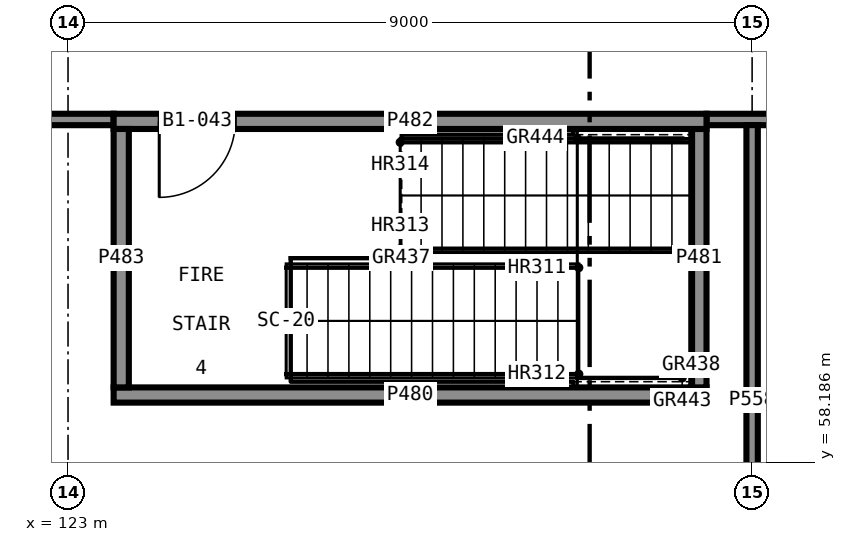
"""IFC4 building model, lengths in metres.
Left out: names, types, materials, properties, quantities, classifications, styles, units other than length and angle.
Written with IfcOpenShell. Run it as: python <this file> out.ifc"""

import sys

from ifc_helpers import new_model, si_unit, direction, frame, frame_2d, origin, place, context, subcontext, project, spatial, rectangle, extrude, element, fill, save


model = new_model("IFC4")
c1 = context("Model", 3, precision=1e-05, world=origin(), true_north=direction((0.0, 1.0)))
c2 = subcontext(c1, "Body", "Model", "MODEL_VIEW")
j1 = project(units=[si_unit("LENGTHUNIT", "METRE"), si_unit("PLANEANGLEUNIT", "RADIAN")], contexts=[c1])
p1 = place(None, origin())
s1 = spatial("IfcSite", under=j1, at=p1, CompositionType="ELEMENT")
p2 = place(p1, origin())
s2 = spatial("IfcBuilding", under=s1, at=p2, CompositionType="ELEMENT")
p3 = place(p2, frame((0.0, 0.0, -5.0)))
s3 = spatial("IfcBuildingStorey", under=s2, at=p3, CompositionType="ELEMENT", Elevation=-5.0)
p4 = place(p3, frame((123.6, 59.075, 0.0), z_axis=(0.0, 0.0, 1.0), x_axis=(1.0, 0.0, 0.0)))
e1 = element("IfcWall", 1, at=p4, inside=s3, PredefinedType="SHEAR", context=c2, shape_type="SweptSolid", body=[
    extrude(rectangle(XDim=7.8, YDim=0.2, at=frame_2d((3.9, 0.0))), origin(), (0.0, 0.0, 1.0), 4.58),
])
p5 = place(p3, frame((131.3, 59.175, 0.0), z_axis=(0.0, 0.0, 1.0), x_axis=(0.0, 1.0, 0.0)))
e2 = element("IfcWall", 2, at=p5, inside=s3, PredefinedType="SHEAR", context=c2, shape_type="SweptSolid", body=[
    extrude(rectangle(XDim=3.4, YDim=0.2, at=frame_2d((1.7, 0.0))), origin(), (0.0, 0.0, 1.0), 4.58),
])
p6 = place(p3, frame((131.4, 62.675, 0.0), z_axis=(0.0, 0.0, 1.0), x_axis=(-1.0, 0.0, 0.0)))
e3 = element("IfcWall", 3, at=p6, inside=s3, PredefinedType="SHEAR", context=c2, shape_type="SweptSolid", body=[
    extrude(rectangle(XDim=7.8, YDim=0.2, at=frame_2d((3.9, 0.0))), origin(), (0.0, 0.0, 1.0), 4.58),
])
p7 = place(p6, frame((6.2, 0.0, 0.0)))
e4 = element("IfcOpeningElement", 4, at=p7, cuts=e3, PredefinedType="OPENING", context=c2, shape_type="SweptSolid", body=[
    extrude(rectangle(XDim=1.0, YDim=2.1, at=frame_2d((0.5, 1.05))), frame((0.0, 0.11, 0.0), z_axis=(0.0, -1.0, 0.0), x_axis=(1.0, 0.0, 0.0)), (0.0, 0.0, 1.0), 0.22),
])
p8 = place(p3, frame((123.7, 62.575, 0.0), z_axis=(0.0, 0.0, 1.0), x_axis=(0.0, -1.0, 0.0)))
e5 = element("IfcWall", 5, at=p8, inside=s3, PredefinedType="SHEAR", context=c2, shape_type="SweptSolid", body=[
    extrude(rectangle(XDim=3.4, YDim=0.2, at=frame_2d((1.7, 0.0))), origin(), (0.0, 0.0, 1.0), 4.58),
])
p9 = place(p3, frame((123.6, 62.7, 0.0), z_axis=(0.0, 0.0, 1.0), x_axis=(-1.0, 0.0, 0.0)))
e6 = element("IfcWall", 6, at=p9, inside=s3, PredefinedType="PARTITIONING", context=c2, shape_type="SweptSolid", body=[
    extrude(rectangle(XDim=2.825, YDim=0.15, at=frame_2d((1.413, 0.0))), origin(), (0.0, 0.0, 1.0), 4.58),
])
p10 = place(p3, frame((143.225, 62.7, 0.0), z_axis=(0.0, 0.0, 1.0), x_axis=(-1.0, 0.0, 0.0)))
e7 = element("IfcWall", 7, at=p10, inside=s3, PredefinedType="PARTITIONING", context=c2, shape_type="SweptSolid", body=[
    extrude(rectangle(XDim=11.825, YDim=0.15, at=frame_2d((5.913, 0.0))), origin(), (0.0, 0.0, 1.0), 4.58),
])
p11 = place(p3, frame((132.0, 55.399, 0.0), z_axis=(0.0, 0.0, 1.0), x_axis=(0.0, 1.0, 0.0)))
e8 = element("IfcWall", 8, at=p11, inside=s3, PredefinedType="PARTITIONING", context=c2, shape_type="SweptSolid", body=[
    extrude(rectangle(XDim=7.227, YDim=0.15, at=frame_2d((3.614, 0.0))), origin(), (0.0, 0.0, 1.0), 3.68),
])
p12 = place(p7, origin())
e9 = element("IfcDoor", 9, at=p12, inside=s3, OperationType="SINGLE_SWING_LEFT", PredefinedType="DOOR", context=c2, shape_type="SweptSolid", body=[
    extrude(rectangle(XDim=1.0, YDim=2.1, at=frame_2d((0.5, 1.05))), frame((0.0, 0.025, 0.0), z_axis=(0.0, -1.0, 0.0), x_axis=(1.0, 0.0, 0.0)), (0.0, 0.0, 1.0), 0.05),
])
fill(e4, e9)
save(model, sys.argv[1])
